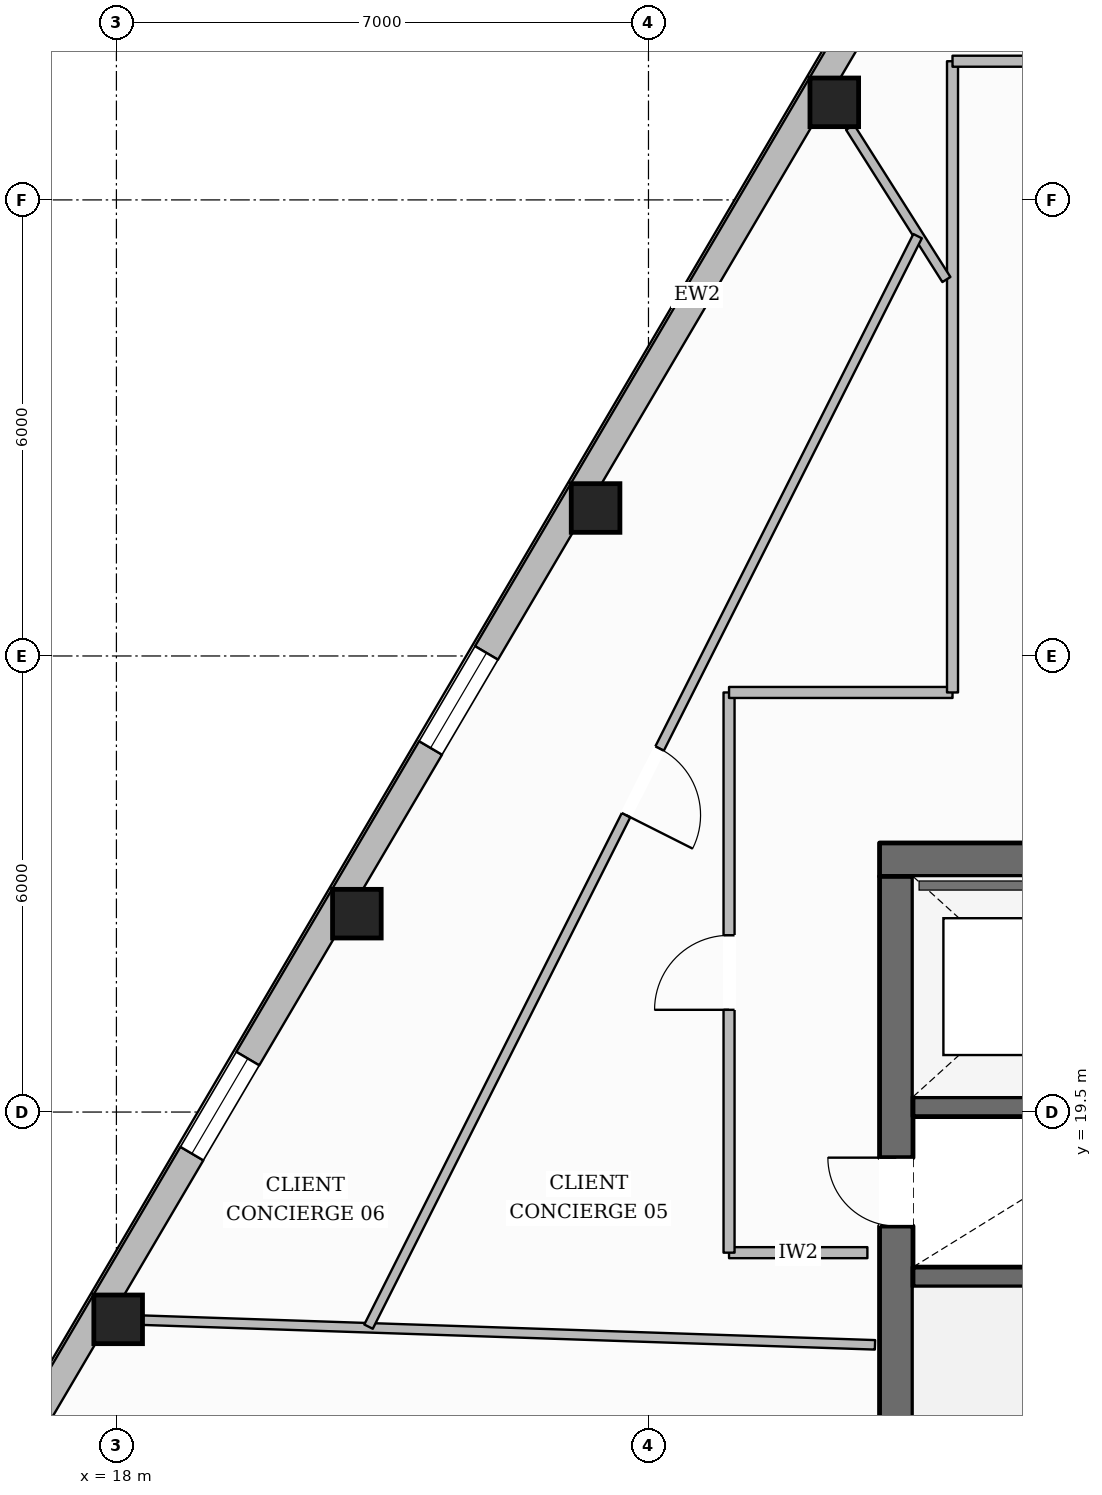
"""IFC4 building model, lengths in metres.
Left out: names, types, materials, properties, quantities, classifications, styles, units other than length and angle.
Written with IfcOpenShell. Run it as: python <this file> out.ifc"""

import sys

from ifc_helpers import new_model, si_unit, direction, frame, frame_2d, origin, origin_2d, place, context, subcontext, project, spatial, rectangle, hollow_rectangle, extrude, element, fill, save


model = new_model("IFC4")
c1 = context("Model", 3, precision=1e-05, world=origin(), true_north=direction((0.0, 1.0)))
c2 = subcontext(c1, "Body", "Model", "MODEL_VIEW")
j1 = project(units=[si_unit("LENGTHUNIT", "METRE"), si_unit("PLANEANGLEUNIT", "RADIAN")], contexts=[c1])
p1 = place(None, origin())
s1 = spatial("IfcSite", under=j1, at=p1, CompositionType="ELEMENT")
p2 = place(p1, origin())
s2 = spatial("IfcBuilding", under=s1, at=p2, CompositionType="ELEMENT")
p3 = place(p2, frame((0.0, 0.0, 203.5)))
s3 = spatial("IfcBuildingStorey", under=s2, at=p3, CompositionType="ELEMENT", Elevation=203.5)
p4 = place(p3, frame((28.04, 22.82, 0.0), z_axis=(0.0, 0.0, 1.0), x_axis=(1.0, 0.0, 0.0)))
e1 = element("IfcWall", 1, at=p4, inside=s3, PredefinedType="SOLIDWALL", context=c2, shape_type="SweptSolid", body=[
    extrude(rectangle(XDim=19.92, YDim=0.44, at=frame_2d((9.96, 0.0))), origin(), (0.0, 0.0, 1.0), 3.6),
])
p5 = place(p4, frame((6.235, 0.0, 0.0)))
e2 = element("IfcOpeningElement", 2, at=p5, cuts=e1, PredefinedType="OPENING", context=c2, shape_type="SweptSolid", body=[
    extrude(rectangle(XDim=1.05, YDim=2.15, at=frame_2d((0.525, 1.075))), frame((0.0, 0.23, 0.0), z_axis=(0.0, -1.0, 0.0), x_axis=(1.0, 0.0, 0.0)), (0.0, 0.0, 1.0), 0.46),
])
p6 = place(p4, frame((12.635, 0.0, 0.0)))
e3 = element("IfcOpeningElement", 3, at=p6, cuts=e1, PredefinedType="OPENING", context=c2, shape_type="SweptSolid", body=[
    extrude(rectangle(XDim=1.05, YDim=2.15, at=frame_2d((0.525, 1.075))), frame((0.0, 0.23, 0.0), z_axis=(0.0, -1.0, 0.0), x_axis=(1.0, 0.0, 0.0)), (0.0, 0.0, 1.0), 0.46),
])
p7 = place(p3, frame((28.26, 9.6, 0.0), z_axis=(0.0, 0.0, 1.0), x_axis=(0.0, 1.0, 0.0)))
e4 = element("IfcWall", 4, at=p7, inside=s3, PredefinedType="SOLIDWALL", context=c2, shape_type="SweptSolid", body=[
    extrude(rectangle(XDim=13.0, YDim=0.44, at=frame_2d((6.5, 0.0))), origin(), (0.0, 0.0, 1.0), 3.6),
])
p8 = place(p7, frame((0.2, 0.0, 0.0)))
e5 = element("IfcOpeningElement", 5, at=p8, cuts=e4, PredefinedType="OPENING", context=c2, shape_type="SweptSolid", body=[
    extrude(rectangle(XDim=1.1, YDim=2.15, at=frame_2d((0.55, 1.075))), frame((0.0, 0.23, 0.0), z_axis=(0.0, -1.0, 0.0), x_axis=(1.0, 0.0, 0.0)), (0.0, 0.0, 1.0), 0.46),
])
p9 = place(p7, frame((8.4, 0.0, 0.0)))
e6 = element("IfcOpeningElement", 6, at=p9, cuts=e4, PredefinedType="OPENING", context=c2, shape_type="SweptSolid", body=[
    extrude(rectangle(XDim=0.9, YDim=2.1, at=frame_2d((0.45, 1.05))), frame((0.0, 0.23, 0.0), z_axis=(0.0, -1.0, 0.0), x_axis=(1.0, 0.0, 0.0)), (0.0, 0.0, 1.0), 0.46),
])
for number, where, z_axis, x_axis in (
    (7, (28.48, 17.33, 0.0), (0.0, 0.0, 1.0), (1.0, 0.0, 0.0)),
    (8, (28.48, 19.57, 0.0), (0.0, 0.0, 1.0), (1.0, 0.0, 0.0)),
):
    element("IfcWall", number, at=place(p3, frame(where, z_axis=z_axis, x_axis=x_axis)), inside=s3, PredefinedType="SHEAR", context=c2, shape_type="SweptSolid", body=[
        extrude(rectangle(XDim=3.2, YDim=0.26, at=frame_2d((1.6, 0.0))), origin(), (0.0, 0.0, 1.0), 3.6),
    ])
for number, where, z_axis, x_axis in (
    (9, (27.445, 32.784, 0.0), (0.0, 0.0, 1.0), (1.0, 0.0, 0.0)),
    (10, (24.304, 27.447, 0.0), (0.0, 0.0, 1.0), (1.0, 0.0, 0.0)),
    (11, (21.164, 22.11, 0.0), (0.0, 0.0, 1.0), (1.0, 0.0, 0.0)),
    (12, (18.023, 16.773, 0.0), (0.0, 0.0, 1.0), (1.0, 0.0, 0.0)),
):
    element("IfcColumn", number, at=place(p3, frame(where, z_axis=z_axis, x_axis=x_axis)), inside=s3, PredefinedType="COLUMN", context=c2, shape_type="SweptSolid", body=[
        extrude(hollow_rectangle(XDim=0.64, YDim=0.64, WallThickness=0.028, at=origin_2d()), origin(), (0.0, 0.0, 1.0), 3.6),
    ])
p10 = place(p3, frame((14.405, 11.157, 0.0), z_axis=(0.0, 0.0, 1.0), x_axis=(0.507147779291, 0.861859112593, 0.0)))
e13 = element("IfcWall", 13, at=p10, inside=s3, PredefinedType="STANDARD", context=c2, shape_type="SweptSolid", body=[
    extrude(rectangle(XDim=38.111, YDim=0.35, at=frame_2d((19.056, 0.0))), origin(), (0.0, 0.0, 1.0), 3.132),
])
p11 = place(p10, frame((33.816, 0.0, 0.65)))
e14 = element("IfcOpeningElement", 14, at=p11, cuts=e13, PredefinedType="OPENING", context=c2, shape_type="SweptSolid", body=[
    extrude(rectangle(XDim=1.45, YDim=1.75, at=frame_2d((0.725, 0.875))), frame((0.0, 0.185, 0.0), z_axis=(0.0, -1.0, 0.0), x_axis=(1.0, 0.0, 0.0)), (0.0, 0.0, 1.0), 0.37),
])
p12 = place(p10, frame((27.623, 0.0, 0.65)))
e15 = element("IfcOpeningElement", 15, at=p12, cuts=e13, PredefinedType="OPENING", context=c2, shape_type="SweptSolid", body=[
    extrude(rectangle(XDim=1.45, YDim=1.75, at=frame_2d((0.725, 0.875))), frame((0.0, 0.185, 0.0), z_axis=(0.0, -1.0, 0.0), x_axis=(1.0, 0.0, 0.0)), (0.0, 0.0, 1.0), 0.37),
])
p13 = place(p10, frame((15.239, 0.0, 0.65)))
e16 = element("IfcOpeningElement", 16, at=p13, cuts=e13, PredefinedType="OPENING", context=c2, shape_type="SweptSolid", body=[
    extrude(rectangle(XDim=1.45, YDim=1.75, at=frame_2d((0.725, 0.875))), frame((0.0, 0.185, 0.0), z_axis=(0.0, -1.0, 0.0), x_axis=(1.0, 0.0, 0.0)), (0.0, 0.0, 1.0), 0.37),
])
p14 = place(p10, frame((9.046, 0.0, 0.65)))
e17 = element("IfcOpeningElement", 17, at=p14, cuts=e13, PredefinedType="OPENING", context=c2, shape_type="SweptSolid", body=[
    extrude(rectangle(XDim=1.45, YDim=1.75, at=frame_2d((0.725, 0.875))), frame((0.0, 0.185, 0.0), z_axis=(0.0, -1.0, 0.0), x_axis=(1.0, 0.0, 0.0)), (0.0, 0.0, 1.0), 0.37),
])
p15 = place(p10, frame((2.854, 0.0, 0.65)))
e18 = element("IfcOpeningElement", 18, at=p15, cuts=e13, PredefinedType="OPENING", context=c2, shape_type="SweptSolid", body=[
    extrude(rectangle(XDim=1.45, YDim=1.75, at=frame_2d((0.725, 0.875))), frame((0.0, 0.185, 0.0), z_axis=(0.0, -1.0, 0.0), x_axis=(1.0, 0.0, 0.0)), (0.0, 0.0, 1.0), 0.37),
])
p16 = place(p3, frame((27.88, 17.65, 0.0), z_axis=(0.0, 0.0, 1.0), x_axis=(-1.0, 0.0, 0.0)))
e19 = element("IfcWall", 19, at=p16, inside=s3, PredefinedType="PARTITIONING", context=c2, shape_type="SweptSolid", body=[
    extrude(rectangle(XDim=1.82, YDim=0.145, at=frame_2d((0.91, 0.0))), origin(), (0.0, 0.0, 1.0), 3.6),
])
p17 = place(p3, frame((26.06, 17.65, 0.0), z_axis=(0.0, 0.0, 1.0), x_axis=(0.0, 1.0, 0.0)))
e20 = element("IfcWall", 20, at=p17, inside=s3, PredefinedType="PARTITIONING", context=c2, shape_type="SweptSolid", body=[
    extrude(rectangle(XDim=7.37, YDim=0.145, at=frame_2d((3.685, 0.0))), origin(), (0.0, 0.0, 1.0), 3.339),
])
p18 = place(p17, frame((3.195, 0.0, 0.0)))
e21 = element("IfcOpeningElement", 21, at=p18, cuts=e20, PredefinedType="OPENING", context=c2, shape_type="SweptSolid", body=[
    extrude(rectangle(XDim=0.98, YDim=2.15, at=frame_2d((0.49, 1.075))), frame((0.0, 0.083, 0.0), z_axis=(0.0, -1.0, 0.0), x_axis=(1.0, 0.0, 0.0)), (0.0, 0.0, 1.0), 0.165),
])
p19 = place(p3, frame((26.06, 25.02, 0.0), z_axis=(0.0, 0.0, 1.0), x_axis=(1.0, 0.0, 0.0)))
e22 = element("IfcWall", 22, at=p19, inside=s3, PredefinedType="PARTITIONING", context=c2, shape_type="SweptSolid", body=[
    extrude(rectangle(XDim=2.94, YDim=0.145, at=frame_2d((1.47, 0.0))), origin(), (0.0, 0.0, 1.0), 3.6),
])
p20 = place(p3, frame((29.0, 25.02, 0.0), z_axis=(0.0, 0.0, 1.0), x_axis=(0.0, 1.0, 0.0)))
e23 = element("IfcWall", 23, at=p20, inside=s3, PredefinedType="PARTITIONING", context=c2, shape_type="SweptSolid", body=[
    extrude(rectangle(XDim=8.304, YDim=0.145, at=frame_2d((4.152, 0.0))), origin(), (0.0, 0.0, 1.0), 3.6),
])
p21 = place(p3, frame((29.0, 33.324, 0.0), z_axis=(0.0, 0.0, 1.0), x_axis=(1.0, 0.0, 0.0)))
e24 = element("IfcWall", 24, at=p21, inside=s3, PredefinedType="PARTITIONING", context=c2, shape_type="SweptSolid", body=[
    extrude(rectangle(XDim=2.0, YDim=0.145, at=frame_2d((1.0, 0.0))), origin(), (0.0, 0.0, 1.0), 3.6),
])
p22 = place(p3, frame((28.919, 30.452, 0.0), z_axis=(0.0, 0.0, 1.0), x_axis=(-0.53460118531, 0.845104474408, 0.0)))
e25 = element("IfcWall", 25, at=p22, inside=s3, PredefinedType="PARTITIONING", context=c2, shape_type="SweptSolid", body=[
    extrude(rectangle(XDim=2.371, YDim=0.125, at=frame_2d((1.185, 0.0))), origin(), (0.0, 0.0, 1.0), 3.6),
])
p23 = place(p3, frame((27.98, 16.438, 0.0), z_axis=(0.0, 0.0, 1.0), x_axis=(-0.999433600002, 0.033652328114, 0.0)))
e26 = element("IfcWall", 26, at=p23, inside=s3, PredefinedType="PARTITIONING", context=c2, shape_type="SweptSolid", body=[
    extrude(rectangle(XDim=9.634, YDim=0.125, at=frame_2d((4.817, 0.0))), origin(), (0.0, 0.0, 1.0), 3.141),
])
p24 = place(p3, frame((48.368, 33.339, 0.0), z_axis=(0.0, 0.0, 1.0), x_axis=(-0.994040131704, 0.109014753872, 0.0)))
e27 = element("IfcWall", 27, at=p24, inside=s3, PredefinedType="PARTITIONING", context=c2, shape_type="SweptSolid", body=[
    extrude(rectangle(XDim=19.596, YDim=0.125, at=frame_2d((9.798, 0.0))), origin(), (0.0, 0.0, 1.0), 3.6),
])
p25 = place(p24, frame((10.309, 0.0, 0.0)))
e28 = element("IfcOpeningElement", 28, at=p25, cuts=e27, PredefinedType="OPENING", context=c2, shape_type="SweptSolid", body=[
    extrude(rectangle(XDim=0.98, YDim=2.15, at=frame_2d((0.49, 1.075))), frame((0.0, 0.073, 0.0), z_axis=(0.0, -1.0, 0.0), x_axis=(1.0, 0.0, 0.0)), (0.0, 0.0, 1.0), 0.145),
])
p26 = place(p3, frame((28.541, 31.023, 0.0), z_axis=(0.0, 0.0, 1.0), x_axis=(-0.449722790535, -0.893168187786, 0.0)))
e29 = element("IfcWall", 29, at=p26, inside=s3, PredefinedType="PARTITIONING", context=c2, shape_type="SweptSolid", body=[
    extrude(rectangle(XDim=16.062, YDim=0.125, at=frame_2d((8.031, 0.0))), origin(), (0.0, 0.0, 1.0), 3.339),
])
p27 = place(p26, frame((7.548, 0.0, 0.0)))
e30 = element("IfcOpeningElement", 30, at=p27, cuts=e29, PredefinedType="OPENING", context=c2, shape_type="SweptSolid", body=[
    extrude(rectangle(XDim=0.98, YDim=2.15, at=frame_2d((0.49, 1.075))), frame((0.0, 0.073, 0.0), z_axis=(0.0, -1.0, 0.0), x_axis=(1.0, 0.0, 0.0)), (0.0, 0.0, 1.0), 0.145),
])
p28 = place(p13, origin())
e31 = element("IfcWindow", 31, at=p28, inside=s3, PartitioningType="SINGLE_PANEL", PredefinedType="WINDOW", context=c2, shape_type="SweptSolid", body=[
    extrude(rectangle(XDim=1.45, YDim=1.75, at=frame_2d((0.725, 0.875))), frame((0.0, 0.03, 0.0), z_axis=(0.0, -1.0, 0.0), x_axis=(1.0, 0.0, 0.0)), (0.0, 0.0, 1.0), 0.06),
])
fill(e16, e31)
p29 = place(p14, origin())
e32 = element("IfcWindow", 32, at=p29, inside=s3, PartitioningType="SINGLE_PANEL", PredefinedType="WINDOW", context=c2, shape_type="SweptSolid", body=[
    extrude(rectangle(XDim=1.45, YDim=1.75, at=frame_2d((0.725, 0.875))), frame((0.0, 0.03, 0.0), z_axis=(0.0, -1.0, 0.0), x_axis=(1.0, 0.0, 0.0)), (0.0, 0.0, 1.0), 0.06),
])
fill(e17, e32)
p30 = place(p9, origin())
e33 = element("IfcDoor", 33, at=p30, inside=s3, OperationType="SINGLE_SWING_RIGHT", PredefinedType="DOOR", context=c2, shape_type="SweptSolid", body=[
    extrude(rectangle(XDim=0.9, YDim=2.1, at=frame_2d((0.45, 1.05))), frame((0.0, 0.025, 0.0), z_axis=(0.0, -1.0, 0.0), x_axis=(1.0, 0.0, 0.0)), (0.0, 0.0, 1.0), 0.05),
])
fill(e6, e33)
p31 = place(p18, origin())
e34 = element("IfcDoor", 34, at=p31, inside=s3, OperationType="SINGLE_SWING_LEFT", PredefinedType="DOOR", context=c2, shape_type="SweptSolid", body=[
    extrude(rectangle(XDim=0.98, YDim=2.15, at=frame_2d((0.49, 1.075))), frame((0.0, 0.025, 0.0), z_axis=(0.0, -1.0, 0.0), x_axis=(1.0, 0.0, 0.0)), (0.0, 0.0, 1.0), 0.05),
])
fill(e21, e34)
p32 = place(p27, origin())
e35 = element("IfcDoor", 35, at=p32, inside=s3, OperationType="SINGLE_SWING_RIGHT", PredefinedType="DOOR", context=c2, shape_type="SweptSolid", body=[
    extrude(rectangle(XDim=0.98, YDim=2.15, at=frame_2d((0.49, 1.075))), frame((0.0, 0.025, 0.0), z_axis=(0.0, -1.0, 0.0), x_axis=(1.0, 0.0, 0.0)), (0.0, 0.0, 1.0), 0.05),
])
fill(e30, e35)
save(model, sys.argv[1])
